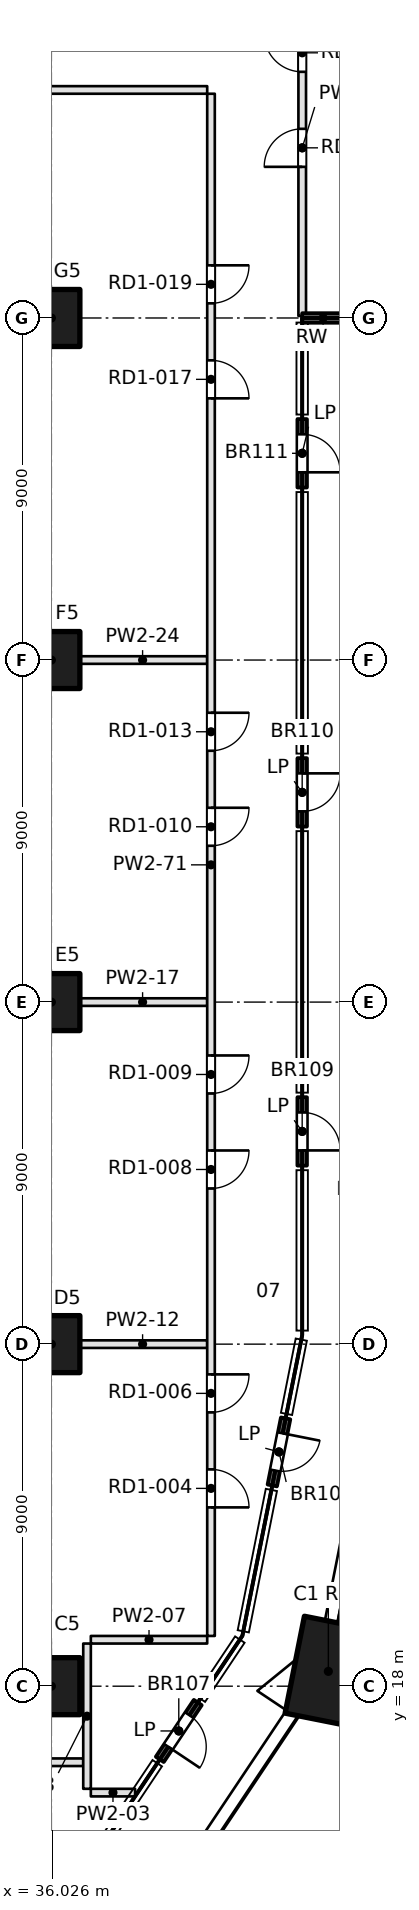
"""IFC4 building model, lengths in metres.
Left out: names, types, materials, properties, quantities, classifications, styles, units other than length and angle.
Written with IfcOpenShell. Run it as: python <this file> out.ifc"""

import sys

from ifc_helpers import new_model, si_unit, direction, frame, frame_2d, origin, origin_2d, place, context, subcontext, project, spatial, rectangle, extrude, element, fill, save


model = new_model("IFC4")
c1 = context("Model", 3, precision=1e-05, world=origin(), true_north=direction((0.0, 1.0)))
c2 = subcontext(c1, "Body", "Model", "MODEL_VIEW")
j1 = project(units=[si_unit("LENGTHUNIT", "METRE"), si_unit("PLANEANGLEUNIT", "RADIAN")], contexts=[c1])
p1 = place(None, origin())
s1 = spatial("IfcSite", under=j1, at=p1, CompositionType="ELEMENT")
p2 = place(p1, origin())
s2 = spatial("IfcBuilding", under=s1, at=p2, CompositionType="ELEMENT")
p3 = place(p2, frame((0.0, 0.0, 31.2)))
s3 = spatial("IfcBuildingStorey", under=s2, at=p3, CompositionType="ELEMENT", Elevation=31.2)
p4 = place(p3, frame((43.287, 18.39, 0.0), z_axis=(0.0, 0.0, 1.0), x_axis=(0.195090322016, 0.980785280403, 0.0)))
e1 = element("IfcColumn", 1, at=p4, inside=s3, PredefinedType="COLUMN", context=c2, shape_type="SweptSolid", body=[
    extrude(rectangle(XDim=2.6, YDim=1.8, at=origin_2d()), origin(), (0.0, 0.0, 1.0), 4.6),
])
for number, where, z_axis, x_axis in (
    (2, (36.0, 18.0, 0.0), (0.0, 0.0, 1.0), (1.0, 0.0, 0.0)),
    (3, (36.0, 27.0, 0.0), (0.0, 0.0, 1.0), (1.0, 0.0, 0.0)),
    (4, (36.0, 36.0, 0.0), (0.0, 0.0, 1.0), (1.0, 0.0, 0.0)),
    (5, (36.0, 45.0, 0.0), (0.0, 0.0, 1.0), (1.0, 0.0, 0.0)),
    (6, (36.0, 54.0, 0.0), (0.0, 0.0, 1.0), (1.0, 0.0, 0.0)),
):
    element("IfcColumn", number, at=place(p3, frame(where, z_axis=z_axis, x_axis=x_axis)), inside=s3, PredefinedType="COLUMN", context=c2, shape_type="SweptSolid", body=[
        extrude(rectangle(XDim=1.5, YDim=1.5, at=origin_2d()), origin(), (0.0, 0.0, 1.0), 4.6),
    ])
p5 = place(p3, frame((38.852, 16.074, 0.0), z_axis=(0.0, 0.0, 1.0), x_axis=(0.555576323502, 0.83146554274, 0.0)))
e7 = element("IfcWall", 7, at=p5, inside=s3, PredefinedType="SOLIDWALL", context=c2, shape_type="SweptSolid", body=[
    extrude(rectangle(XDim=1.8, YDim=0.25, at=frame_2d((0.9, 0.0))), origin(), (0.0, 0.0, 1.0), 4.2),
])
p6 = place(p5, frame((0.4, 0.0, 0.0)))
e8 = element("IfcOpeningElement", 8, at=p6, cuts=e7, PredefinedType="OPENING", context=c2, shape_type="SweptSolid", body=[
    extrude(rectangle(XDim=1.0, YDim=2.1, at=frame_2d((0.5, 1.05))), frame((0.0, 0.125, 0.0), z_axis=(0.0, -1.0, 0.0), x_axis=(1.0, 0.0, 0.0)), (0.0, 0.0, 1.0), 0.25),
])
p7 = place(p3, frame((41.812, 23.281, 0.0), z_axis=(0.0, 0.0, 1.0), x_axis=(0.19517704197, 0.980768026746, 0.0)))
e9 = element("IfcWall", 9, at=p7, inside=s3, PredefinedType="SOLIDWALL", context=c2, shape_type="SweptSolid", body=[
    extrude(rectangle(XDim=1.8, YDim=0.25, at=frame_2d((0.9, 0.0))), origin(), (0.0, 0.0, 1.0), 4.2),
])
p8 = place(p7, frame((0.4, 0.0, 0.0)))
e10 = element("IfcOpeningElement", 10, at=p8, cuts=e9, PredefinedType="OPENING", context=c2, shape_type="SweptSolid", body=[
    extrude(rectangle(XDim=1.0, YDim=2.1, at=frame_2d((0.5, 1.05))), frame((0.0, 0.125, 0.0), z_axis=(0.0, -1.0, 0.0), x_axis=(1.0, 0.0, 0.0)), (0.0, 0.0, 1.0), 0.25),
])
p9 = place(p3, frame((42.599, 31.697, 0.0), z_axis=(0.0, 0.0, 1.0), x_axis=(0.0, 1.0, 0.0)))
e11 = element("IfcWall", 11, at=p9, inside=s3, PredefinedType="SOLIDWALL", context=c2, shape_type="SweptSolid", body=[
    extrude(rectangle(XDim=1.8, YDim=0.25, at=frame_2d((0.9, 0.0))), origin(), (0.0, 0.0, 1.0), 4.2),
])
p10 = place(p9, frame((0.4, 0.0, 0.0)))
e12 = element("IfcOpeningElement", 12, at=p10, cuts=e11, PredefinedType="OPENING", context=c2, shape_type="SweptSolid", body=[
    extrude(rectangle(XDim=1.0, YDim=2.1, at=frame_2d((0.5, 1.05))), frame((0.0, 0.125, 0.0), z_axis=(0.0, -1.0, 0.0), x_axis=(1.0, 0.0, 0.0)), (0.0, 0.0, 1.0), 0.25),
])
p11 = place(p3, frame((42.599, 40.618, 0.0), z_axis=(0.0, 0.0, 1.0), x_axis=(0.0, 1.0, 0.0)))
e13 = element("IfcWall", 13, at=p11, inside=s3, PredefinedType="SOLIDWALL", context=c2, shape_type="SweptSolid", body=[
    extrude(rectangle(XDim=1.8, YDim=0.25, at=frame_2d((0.9, 0.0))), origin(), (0.0, 0.0, 1.0), 4.2),
])
p12 = place(p11, frame((0.4, 0.0, 0.0)))
e14 = element("IfcOpeningElement", 14, at=p12, cuts=e13, PredefinedType="OPENING", context=c2, shape_type="SweptSolid", body=[
    extrude(rectangle(XDim=1.0, YDim=2.1, at=frame_2d((0.5, 1.05))), frame((0.0, 0.125, 0.0), z_axis=(0.0, -1.0, 0.0), x_axis=(1.0, 0.0, 0.0)), (0.0, 0.0, 1.0), 0.25),
])
p13 = place(p3, frame((42.599, 49.54, 0.0), z_axis=(0.0, 0.0, 1.0), x_axis=(0.0, 1.0, 0.0)))
e15 = element("IfcWall", 15, at=p13, inside=s3, PredefinedType="SOLIDWALL", context=c2, shape_type="SweptSolid", body=[
    extrude(rectangle(XDim=1.8, YDim=0.25, at=frame_2d((0.9, 0.0))), origin(), (0.0, 0.0, 1.0), 4.2),
])
p14 = place(p13, frame((0.4, 0.0, 0.0)))
e16 = element("IfcOpeningElement", 16, at=p14, cuts=e15, PredefinedType="OPENING", context=c2, shape_type="SweptSolid", body=[
    extrude(rectangle(XDim=1.0, YDim=2.1, at=frame_2d((0.5, 1.05))), frame((0.0, 0.125, 0.0), z_axis=(0.0, -1.0, 0.0), x_axis=(1.0, 0.0, 0.0)), (0.0, 0.0, 1.0), 0.25),
])
p15 = place(p3, frame((42.599, 54.0, 0.0), z_axis=(0.0, 0.0, 1.0), x_axis=(0.999999901628, 0.000443557286, 0.0)))
e17 = element("IfcWall", 17, at=p15, inside=s3, PredefinedType="SOLIDWALL", context=c2, shape_type="SweptSolid", body=[
    extrude(rectangle(XDim=1.101, YDim=0.25, at=frame_2d((0.55, 0.0))), origin(), (0.0, 0.0, 1.0), 4.2),
])
p16 = place(p3, frame((38.203, 15.2, 0.0), z_axis=(0.0, 0.0, 1.0), x_axis=(-1.0, 0.0, 0.0)))
e18 = element("IfcWall", 18, at=p16, inside=s3, PredefinedType="PARTITIONING", context=c2, shape_type="SweptSolid", body=[
    extrude(rectangle(XDim=1.165, YDim=0.2, at=frame_2d((0.583, 0.0))), origin(), (0.0, 0.0, 1.0), 4.2),
])
p17 = place(p3, frame((26.2, 15.999, 0.0), z_axis=(0.0, 0.0, 1.0), x_axis=(1.0, 0.0, 0.0)))
e19 = element("IfcWall", 19, at=p17, inside=s3, PredefinedType="PARTITIONING", context=c2, shape_type="SweptSolid", body=[
    extrude(rectangle(XDim=10.638, YDim=0.2, at=frame_2d((5.319, 0.0))), origin(), (0.0, 0.0, 1.0), 4.2),
])
p18 = place(p3, frame((37.038, 19.222, 0.0), z_axis=(0.0, 0.0, 1.0), x_axis=(1.0, 0.0, 0.0)))
e20 = element("IfcWall", 20, at=p18, inside=s3, PredefinedType="PARTITIONING", context=c2, shape_type="SweptSolid", body=[
    extrude(rectangle(XDim=3.062, YDim=0.2, at=frame_2d((1.531, 0.0))), origin(), (0.0, 0.0, 1.0), 4.2),
])
for number, where, z_axis, x_axis in (
    (21, (36.7, 27.0, 0.0), (0.0, 0.0, 1.0), (1.0, 0.0, 0.0)),
    (22, (36.7, 36.0, 0.0), (0.0, 0.0, 1.0), (1.0, 0.0, 0.0)),
    (23, (36.7, 45.0, 0.0), (0.0, 0.0, 1.0), (1.0, 0.0, 0.0)),
):
    element("IfcWall", number, at=place(p3, frame(where, z_axis=z_axis, x_axis=x_axis)), inside=s3, PredefinedType="PARTITIONING", context=c2, shape_type="SweptSolid", body=[
        extrude(rectangle(XDim=3.4, YDim=0.2, at=frame_2d((1.7, 0.0))), origin(), (0.0, 0.0, 1.0), 4.2),
    ])
p19 = place(p3, frame((40.1, 60.0, 0.0), z_axis=(0.0, 0.0, 1.0), x_axis=(-1.0, 0.0, 0.0)))
e24 = element("IfcWall", 24, at=p19, inside=s3, PredefinedType="PARTITIONING", context=c2, shape_type="SweptSolid", body=[
    extrude(rectangle(XDim=13.853, YDim=0.2, at=frame_2d((6.926, 0.0))), origin(), (0.0, 0.0, 1.0), 4.2),
])
p20 = place(p3, frame((36.938, 15.3, 0.0), z_axis=(0.0, 0.0, 1.0), x_axis=(0.0, 1.0, 0.0)))
e25 = element("IfcWall", 25, at=p20, inside=s3, PredefinedType="PARTITIONING", context=c2, shape_type="SweptSolid", body=[
    extrude(rectangle(XDim=3.822, YDim=0.2, at=frame_2d((1.911, 0.0))), origin(), (0.0, 0.0, 1.0), 4.2),
])
p21 = place(p3, frame((40.2, 19.322, 0.0), z_axis=(0.0, 0.0, 1.0), x_axis=(0.0, 1.0, 0.0)))
e26 = element("IfcWall", 26, at=p21, inside=s3, PredefinedType="PARTITIONING", context=c2, shape_type="SweptSolid", body=[
    extrude(rectangle(XDim=40.578, YDim=0.2, at=frame_2d((20.289, 0.0))), origin(), (0.0, 0.0, 1.0), 4.2),
])
p22 = place(p21, frame((3.383, 0.0, 0.0)))
e27 = element("IfcOpeningElement", 27, at=p22, cuts=e26, PredefinedType="OPENING", context=c2, shape_type="SweptSolid", body=[
    extrude(rectangle(XDim=1.0, YDim=2.1, at=frame_2d((0.5, 1.05))), frame((0.0, 0.1, 0.0), z_axis=(0.0, -1.0, 0.0), x_axis=(1.0, 0.0, 0.0)), (0.0, 0.0, 1.0), 0.2),
])
p23 = place(p21, frame((5.883, 0.0, 0.0)))
e28 = element("IfcOpeningElement", 28, at=p23, cuts=e26, PredefinedType="OPENING", context=c2, shape_type="SweptSolid", body=[
    extrude(rectangle(XDim=1.0, YDim=2.1, at=frame_2d((0.5, 1.05))), frame((0.0, 0.1, 0.0), z_axis=(0.0, -1.0, 0.0), x_axis=(1.0, 0.0, 0.0)), (0.0, 0.0, 1.0), 0.2),
])
p24 = place(p21, frame((11.774, 0.0, 0.0)))
e29 = element("IfcOpeningElement", 29, at=p24, cuts=e26, PredefinedType="OPENING", context=c2, shape_type="SweptSolid", body=[
    extrude(rectangle(XDim=1.0, YDim=2.1, at=frame_2d((0.5, 1.05))), frame((0.0, 0.1, 0.0), z_axis=(0.0, -1.0, 0.0), x_axis=(1.0, 0.0, 0.0)), (0.0, 0.0, 1.0), 0.2),
])
p25 = place(p21, frame((14.274, 0.0, 0.0)))
e30 = element("IfcOpeningElement", 30, at=p25, cuts=e26, PredefinedType="OPENING", context=c2, shape_type="SweptSolid", body=[
    extrude(rectangle(XDim=1.0, YDim=2.1, at=frame_2d((0.5, 1.05))), frame((0.0, 0.1, 0.0), z_axis=(0.0, -1.0, 0.0), x_axis=(1.0, 0.0, 0.0)), (0.0, 0.0, 1.0), 0.2),
])
p26 = place(p21, frame((20.791, 0.0, 0.0)))
e31 = element("IfcOpeningElement", 31, at=p26, cuts=e26, PredefinedType="OPENING", context=c2, shape_type="SweptSolid", body=[
    extrude(rectangle(XDim=1.0, YDim=2.1, at=frame_2d((0.5, 1.05))), frame((0.0, 0.1, 0.0), z_axis=(0.0, -1.0, 0.0), x_axis=(1.0, 0.0, 0.0)), (0.0, 0.0, 1.0), 0.2),
])
p27 = place(p21, frame((23.291, 0.0, 0.0)))
e32 = element("IfcOpeningElement", 32, at=p27, cuts=e26, PredefinedType="OPENING", context=c2, shape_type="SweptSolid", body=[
    extrude(rectangle(XDim=1.0, YDim=2.1, at=frame_2d((0.5, 1.05))), frame((0.0, 0.1, 0.0), z_axis=(0.0, -1.0, 0.0), x_axis=(1.0, 0.0, 0.0)), (0.0, 0.0, 1.0), 0.2),
])
p28 = place(p21, frame((32.564, 0.0, 0.0)))
e33 = element("IfcOpeningElement", 33, at=p28, cuts=e26, PredefinedType="OPENING", context=c2, shape_type="SweptSolid", body=[
    extrude(rectangle(XDim=1.0, YDim=2.1, at=frame_2d((0.5, 1.05))), frame((0.0, 0.1, 0.0), z_axis=(0.0, -1.0, 0.0), x_axis=(1.0, 0.0, 0.0)), (0.0, 0.0, 1.0), 0.2),
])
p29 = place(p21, frame((35.064, 0.0, 0.0)))
e34 = element("IfcOpeningElement", 34, at=p29, cuts=e26, PredefinedType="OPENING", context=c2, shape_type="SweptSolid", body=[
    extrude(rectangle(XDim=1.0, YDim=2.1, at=frame_2d((0.5, 1.05))), frame((0.0, 0.1, 0.0), z_axis=(0.0, -1.0, 0.0), x_axis=(1.0, 0.0, 0.0)), (0.0, 0.0, 1.0), 0.2),
])
p30 = place(p3, frame((42.6, 62.9, 0.0), z_axis=(0.0, 0.0, 1.0), x_axis=(0.0, -1.0, 0.0)))
e35 = element("IfcWall", 35, at=p30, inside=s3, PredefinedType="PARTITIONING", context=c2, shape_type="SweptSolid", body=[
    extrude(rectangle(XDim=8.846, YDim=0.2, at=frame_2d((4.423, 0.0))), origin(), (0.0, 0.0, 1.0), 4.2),
])
p31 = place(p30, frame((3.923, 0.0, 0.0)))
e36 = element("IfcOpeningElement", 36, at=p31, cuts=e35, PredefinedType="OPENING", context=c2, shape_type="SweptSolid", body=[
    extrude(rectangle(XDim=1.0, YDim=2.1, at=frame_2d((0.5, 1.05))), frame((0.0, 0.1, 0.0), z_axis=(0.0, -1.0, 0.0), x_axis=(1.0, 0.0, 0.0)), (0.0, 0.0, 1.0), 0.2),
])
p32 = place(p30, frame((1.423, 0.0, 0.0)))
e37 = element("IfcOpeningElement", 37, at=p32, cuts=e35, PredefinedType="OPENING", context=c2, shape_type="SweptSolid", body=[
    extrude(rectangle(XDim=1.0, YDim=2.1, at=frame_2d((0.5, 1.05))), frame((0.0, 0.1, 0.0), z_axis=(0.0, -1.0, 0.0), x_axis=(1.0, 0.0, 0.0)), (0.0, 0.0, 1.0), 0.2),
])
p33 = place(p6, frame((1.0, 0.0, 0.0), z_axis=(0.0, 0.0, 1.0), x_axis=(-1.0, 0.0, 0.0)))
e38 = element("IfcDoor", 38, at=p33, inside=s3, OperationType="SINGLE_SWING_RIGHT", PredefinedType="DOOR", context=c2, shape_type="SweptSolid", body=[
    extrude(rectangle(XDim=1.0, YDim=2.1, at=frame_2d((0.5, 1.05))), frame((0.0, 0.025, 0.0), z_axis=(0.0, -1.0, 0.0), x_axis=(1.0, 0.0, 0.0)), (0.0, 0.0, 1.0), 0.05),
])
fill(e8, e38)
p34 = place(p8, frame((1.0, 0.0, 0.0), z_axis=(0.0, 0.0, 1.0), x_axis=(-1.0, 0.0, 0.0)))
e39 = element("IfcDoor", 39, at=p34, inside=s3, OperationType="SINGLE_SWING_LEFT", PredefinedType="DOOR", context=c2, shape_type="SweptSolid", body=[
    extrude(rectangle(XDim=1.0, YDim=2.1, at=frame_2d((0.5, 1.05))), frame((0.0, 0.025, 0.0), z_axis=(0.0, -1.0, 0.0), x_axis=(1.0, 0.0, 0.0)), (0.0, 0.0, 1.0), 0.05),
])
fill(e10, e39)
p35 = place(p10, frame((1.0, 0.0, 0.0), z_axis=(0.0, 0.0, 1.0), x_axis=(-1.0, 0.0, 0.0)))
e40 = element("IfcDoor", 40, at=p35, inside=s3, OperationType="SINGLE_SWING_RIGHT", PredefinedType="DOOR", context=c2, shape_type="SweptSolid", body=[
    extrude(rectangle(XDim=1.0, YDim=2.1, at=frame_2d((0.5, 1.05))), frame((0.0, 0.025, 0.0), z_axis=(0.0, -1.0, 0.0), x_axis=(1.0, 0.0, 0.0)), (0.0, 0.0, 1.0), 0.05),
])
fill(e12, e40)
p36 = place(p12, frame((1.0, 0.0, 0.0), z_axis=(0.0, 0.0, 1.0), x_axis=(-1.0, 0.0, 0.0)))
e41 = element("IfcDoor", 41, at=p36, inside=s3, OperationType="SINGLE_SWING_LEFT", PredefinedType="DOOR", context=c2, shape_type="SweptSolid", body=[
    extrude(rectangle(XDim=1.0, YDim=2.1, at=frame_2d((0.5, 1.05))), frame((0.0, 0.025, 0.0), z_axis=(0.0, -1.0, 0.0), x_axis=(1.0, 0.0, 0.0)), (0.0, 0.0, 1.0), 0.05),
])
fill(e14, e41)
p37 = place(p14, frame((1.0, 0.0, 0.0), z_axis=(0.0, 0.0, 1.0), x_axis=(-1.0, 0.0, 0.0)))
e42 = element("IfcDoor", 42, at=p37, inside=s3, OperationType="SINGLE_SWING_RIGHT", PredefinedType="DOOR", context=c2, shape_type="SweptSolid", body=[
    extrude(rectangle(XDim=1.0, YDim=2.1, at=frame_2d((0.5, 1.05))), frame((0.0, 0.025, 0.0), z_axis=(0.0, -1.0, 0.0), x_axis=(1.0, 0.0, 0.0)), (0.0, 0.0, 1.0), 0.05),
])
fill(e16, e42)
p38 = place(p22, frame((1.0, 0.0, 0.0), z_axis=(0.0, 0.0, 1.0), x_axis=(-1.0, 0.0, 0.0)))
e43 = element("IfcDoor", 43, at=p38, inside=s3, OperationType="SINGLE_SWING_RIGHT", PredefinedType="DOOR", context=c2, shape_type="SweptSolid", body=[
    extrude(rectangle(XDim=1.0, YDim=2.1, at=frame_2d((0.5, 1.05))), frame((0.0, 0.025, 0.0), z_axis=(0.0, -1.0, 0.0), x_axis=(1.0, 0.0, 0.0)), (0.0, 0.0, 1.0), 0.05),
])
fill(e27, e43)
p39 = place(p23, frame((1.0, 0.0, 0.0), z_axis=(0.0, 0.0, 1.0), x_axis=(-1.0, 0.0, 0.0)))
e44 = element("IfcDoor", 44, at=p39, inside=s3, OperationType="SINGLE_SWING_LEFT", PredefinedType="DOOR", context=c2, shape_type="SweptSolid", body=[
    extrude(rectangle(XDim=1.0, YDim=2.1, at=frame_2d((0.5, 1.05))), frame((0.0, 0.025, 0.0), z_axis=(0.0, -1.0, 0.0), x_axis=(1.0, 0.0, 0.0)), (0.0, 0.0, 1.0), 0.05),
])
fill(e28, e44)
p40 = place(p24, frame((1.0, 0.0, 0.0), z_axis=(0.0, 0.0, 1.0), x_axis=(-1.0, 0.0, 0.0)))
e45 = element("IfcDoor", 45, at=p40, inside=s3, OperationType="SINGLE_SWING_LEFT", PredefinedType="DOOR", context=c2, shape_type="SweptSolid", body=[
    extrude(rectangle(XDim=1.0, YDim=2.1, at=frame_2d((0.5, 1.05))), frame((0.0, 0.025, 0.0), z_axis=(0.0, -1.0, 0.0), x_axis=(1.0, 0.0, 0.0)), (0.0, 0.0, 1.0), 0.05),
])
fill(e29, e45)
p41 = place(p25, frame((1.0, 0.0, 0.0), z_axis=(0.0, 0.0, 1.0), x_axis=(-1.0, 0.0, 0.0)))
e46 = element("IfcDoor", 46, at=p41, inside=s3, OperationType="SINGLE_SWING_LEFT", PredefinedType="DOOR", context=c2, shape_type="SweptSolid", body=[
    extrude(rectangle(XDim=1.0, YDim=2.1, at=frame_2d((0.5, 1.05))), frame((0.0, 0.025, 0.0), z_axis=(0.0, -1.0, 0.0), x_axis=(1.0, 0.0, 0.0)), (0.0, 0.0, 1.0), 0.05),
])
fill(e30, e46)
p42 = place(p26, frame((1.0, 0.0, 0.0), z_axis=(0.0, 0.0, 1.0), x_axis=(-1.0, 0.0, 0.0)))
e47 = element("IfcDoor", 47, at=p42, inside=s3, OperationType="SINGLE_SWING_LEFT", PredefinedType="DOOR", context=c2, shape_type="SweptSolid", body=[
    extrude(rectangle(XDim=1.0, YDim=2.1, at=frame_2d((0.5, 1.05))), frame((0.0, 0.025, 0.0), z_axis=(0.0, -1.0, 0.0), x_axis=(1.0, 0.0, 0.0)), (0.0, 0.0, 1.0), 0.05),
])
fill(e31, e47)
p43 = place(p27, frame((1.0, 0.0, 0.0), z_axis=(0.0, 0.0, 1.0), x_axis=(-1.0, 0.0, 0.0)))
e48 = element("IfcDoor", 48, at=p43, inside=s3, OperationType="SINGLE_SWING_LEFT", PredefinedType="DOOR", context=c2, shape_type="SweptSolid", body=[
    extrude(rectangle(XDim=1.0, YDim=2.1, at=frame_2d((0.5, 1.05))), frame((0.0, 0.025, 0.0), z_axis=(0.0, -1.0, 0.0), x_axis=(1.0, 0.0, 0.0)), (0.0, 0.0, 1.0), 0.05),
])
fill(e32, e48)
p44 = place(p28, frame((1.0, 0.0, 0.0), z_axis=(0.0, 0.0, 1.0), x_axis=(-1.0, 0.0, 0.0)))
e49 = element("IfcDoor", 49, at=p44, inside=s3, OperationType="SINGLE_SWING_RIGHT", PredefinedType="DOOR", context=c2, shape_type="SweptSolid", body=[
    extrude(rectangle(XDim=1.0, YDim=2.1, at=frame_2d((0.5, 1.05))), frame((0.0, 0.025, 0.0), z_axis=(0.0, -1.0, 0.0), x_axis=(1.0, 0.0, 0.0)), (0.0, 0.0, 1.0), 0.05),
])
fill(e33, e49)
p45 = place(p29, frame((1.0, 0.0, 0.0), z_axis=(0.0, 0.0, 1.0), x_axis=(-1.0, 0.0, 0.0)))
e50 = element("IfcDoor", 50, at=p45, inside=s3, OperationType="SINGLE_SWING_LEFT", PredefinedType="DOOR", context=c2, shape_type="SweptSolid", body=[
    extrude(rectangle(XDim=1.0, YDim=2.1, at=frame_2d((0.5, 1.05))), frame((0.0, 0.025, 0.0), z_axis=(0.0, -1.0, 0.0), x_axis=(1.0, 0.0, 0.0)), (0.0, 0.0, 1.0), 0.05),
])
fill(e34, e50)
p46 = place(p31, frame((1.0, 0.0, 0.0), z_axis=(0.0, 0.0, 1.0), x_axis=(-1.0, 0.0, 0.0)))
e51 = element("IfcDoor", 51, at=p46, inside=s3, OperationType="SINGLE_SWING_LEFT", PredefinedType="DOOR", context=c2, shape_type="SweptSolid", body=[
    extrude(rectangle(XDim=1.0, YDim=2.1, at=frame_2d((0.5, 1.05))), frame((0.0, 0.025, 0.0), z_axis=(0.0, -1.0, 0.0), x_axis=(1.0, 0.0, 0.0)), (0.0, 0.0, 1.0), 0.05),
])
fill(e36, e51)
p47 = place(p32, frame((1.0, 0.0, 0.0), z_axis=(0.0, 0.0, 1.0), x_axis=(-1.0, 0.0, 0.0)))
e52 = element("IfcDoor", 52, at=p47, inside=s3, OperationType="SINGLE_SWING_RIGHT", PredefinedType="DOOR", context=c2, shape_type="SweptSolid", body=[
    extrude(rectangle(XDim=1.0, YDim=2.1, at=frame_2d((0.5, 1.05))), frame((0.0, 0.025, 0.0), z_axis=(0.0, -1.0, 0.0), x_axis=(1.0, 0.0, 0.0)), (0.0, 0.0, 1.0), 0.05),
])
fill(e37, e52)
save(model, sys.argv[1])
